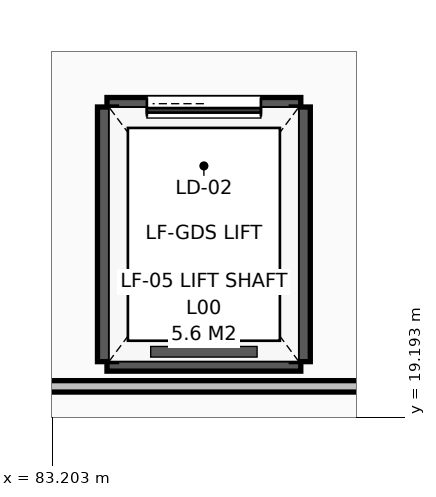
"""IFC4 building model, lengths in metres.
Left out: names, types, materials, properties, quantities, classifications, styles, units other than length and angle.
Written with IfcOpenShell. Run it as: python <this file> out.ifc"""

import sys

from ifc_helpers import new_model, si_unit, direction, frame, frame_2d, origin, place, context, subcontext, project, spatial, rectangle, extrude, element, fill, save


model = new_model("IFC4")
c1 = context("Model", 3, precision=1e-05, world=origin(), true_north=direction((0.0, 1.0)))
c2 = subcontext(c1, "Body", "Model", "MODEL_VIEW")
j1 = project(units=[si_unit("LENGTHUNIT", "METRE"), si_unit("PLANEANGLEUNIT", "RADIAN")], contexts=[c1])
p1 = place(None, origin())
s1 = spatial("IfcSite", under=j1, at=p1, CompositionType="ELEMENT")
p2 = place(p1, origin())
s2 = spatial("IfcBuilding", under=s1, at=p2, CompositionType="ELEMENT")
p3 = place(p2, origin())
s3 = spatial("IfcBuildingStorey", under=s2, at=p3, CompositionType="ELEMENT", Elevation=0.0)
p4 = place(p3, frame((83.925, 19.925, 0.0), z_axis=(0.0, 0.0, 1.0), x_axis=(1.0, 0.0, 0.0)))
e1 = element("IfcWall", 1, at=p4, inside=s3, PredefinedType="SHEAR", context=c2, shape_type="SweptSolid", body=[
    extrude(rectangle(XDim=2.55, YDim=0.25, at=frame_2d((1.275, 0.0))), origin(), (0.0, 0.0, 1.0), 4.5),
])
p5 = place(p3, frame((86.475, 23.275, 0.0), z_axis=(0.0, 0.0, 1.0), x_axis=(-1.0, 0.0, 0.0)))
e2 = element("IfcWall", 2, at=p5, inside=s3, PredefinedType="SHEAR", context=c2, shape_type="SweptSolid", body=[
    extrude(rectangle(XDim=2.55, YDim=0.25, at=frame_2d((1.275, 0.0))), origin(), (0.0, 0.0, 1.0), 4.5),
])
p6 = place(p5, frame((0.525, 0.0, 0.0)))
e3 = element("IfcOpeningElement", 3, at=p6, cuts=e2, PredefinedType="OPENING", context=c2, shape_type="SweptSolid", body=[
    extrude(rectangle(XDim=1.5, YDim=2.2, at=frame_2d((0.75, 1.1))), frame((0.0, 0.135, 0.0), z_axis=(0.0, -1.0, 0.0), x_axis=(1.0, 0.0, 0.0)), (0.0, 0.0, 1.0), 0.27),
])
for number, where, z_axis, x_axis in (
    (4, (83.925, 23.275, 0.0), (0.0, 0.0, 1.0), (0.0, -1.0, 0.0)),
    (5, (86.475, 19.925, 0.0), (0.0, 0.0, 1.0), (0.0, 1.0, 0.0)),
):
    element("IfcWall", number, at=place(p3, frame(where, z_axis=z_axis, x_axis=x_axis)), inside=s3, PredefinedType="SHEAR", context=c2, shape_type="SweptSolid", body=[
        extrude(rectangle(XDim=3.35, YDim=0.25, at=frame_2d((1.675, 0.0))), origin(), (0.0, 0.0, 1.0), 4.5),
    ])
p7 = place(p3, frame((92.4, 19.6, 0.0), z_axis=(0.0, 0.0, 1.0), x_axis=(-1.0, 0.0, 0.0)))
e6 = element("IfcWall", 6, at=p7, inside=s3, PredefinedType="PARTITIONING", context=c2, shape_type="SweptSolid", body=[
    extrude(rectangle(XDim=36.4, YDim=0.15, at=frame_2d((18.2, 0.0))), origin(), (0.0, 0.0, 1.0), 3.682),
])
p8 = place(p6, origin())
e7 = element("IfcDoor", 7, at=p8, inside=s3, OperationType="SLIDING_TO_RIGHT", PredefinedType="DOOR", context=c2, shape_type="SweptSolid", body=[
    extrude(rectangle(XDim=1.5, YDim=2.2, at=frame_2d((0.75, 1.1))), frame((0.0, 0.025, 0.0), z_axis=(0.0, -1.0, 0.0), x_axis=(1.0, 0.0, 0.0)), (0.0, 0.0, 1.0), 0.05),
])
fill(e3, e7)
save(model, sys.argv[1])
